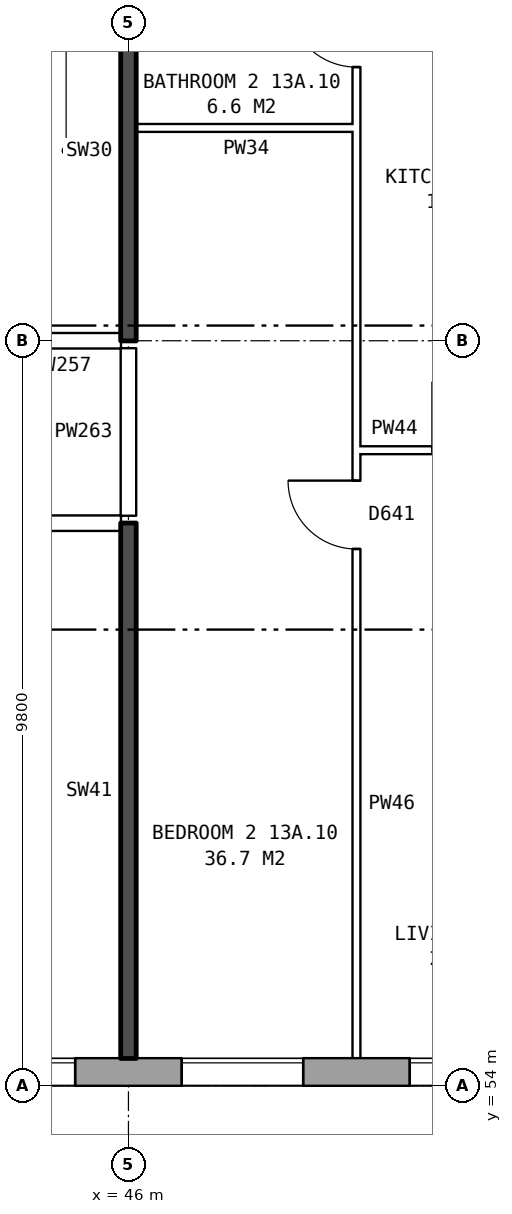
"""IFC4 building model, lengths in metres.
Left out: names, types, materials, properties, quantities, classifications, styles, units other than length and angle.
Written with IfcOpenShell. Run it as: python <this file> out.ifc"""

import sys

from ifc_helpers import new_model, si_unit, direction, frame, frame_2d, origin, place, context, subcontext, project, spatial, rectangle, extrude, element, fill, save


model = new_model("IFC4")
c1 = context("Model", 3, precision=1e-05, world=origin(), true_north=direction((0.0, 1.0)))
c2 = subcontext(c1, "Body", "Model", "MODEL_VIEW")
j1 = project(units=[si_unit("LENGTHUNIT", "METRE"), si_unit("PLANEANGLEUNIT", "RADIAN")], contexts=[c1])
p1 = place(None, origin())
s1 = spatial("IfcSite", under=j1, at=p1, CompositionType="ELEMENT")
p2 = place(p1, origin())
s2 = spatial("IfcBuilding", under=s1, at=p2, CompositionType="ELEMENT")
p3 = place(p2, frame((0.0, 0.0, 50.5)))
s3 = spatial("IfcBuildingStorey", under=s2, at=p3, CompositionType="ELEMENT", Elevation=50.5)
p4 = place(p3, frame((24.575, 54.18, 0.0), z_axis=(0.0, 0.0, 1.0), x_axis=(1.0, 0.0, 0.0)))
e1 = element("IfcWall", 1, at=p4, inside=s3, PredefinedType="STANDARD", context=c2, shape_type="SweptSolid", body=[
    extrude(rectangle(XDim=48.351, YDim=0.36, at=frame_2d((24.175, 0.0))), origin(), (0.0, 0.0, 1.0), 2.85),
])
p5 = place(p4, frame((1.125, 0.0, 0.8)))
e2 = element("IfcOpeningElement", 2, at=p5, cuts=e1, PredefinedType="OPENING", context=c2, shape_type="SweptSolid", body=[
    extrude(rectangle(XDim=1.6, YDim=1.8, at=frame_2d((0.8, 0.9))), frame((0.0, 0.19, 0.0), z_axis=(0.0, -1.0, 0.0), x_axis=(1.0, 0.0, 0.0)), (0.0, 0.0, 1.0), 0.38),
])
p6 = place(p4, frame((4.125, 0.0, 0.8)))
e3 = element("IfcOpeningElement", 3, at=p6, cuts=e1, PredefinedType="OPENING", context=c2, shape_type="SweptSolid", body=[
    extrude(rectangle(XDim=1.6, YDim=1.8, at=frame_2d((0.8, 0.9))), frame((0.0, 0.19, 0.0), z_axis=(0.0, -1.0, 0.0), x_axis=(1.0, 0.0, 0.0)), (0.0, 0.0, 1.0), 0.38),
])
p7 = place(p4, frame((6.025, 0.0, 0.8)))
e4 = element("IfcOpeningElement", 4, at=p7, cuts=e1, PredefinedType="OPENING", context=c2, shape_type="SweptSolid", body=[
    extrude(rectangle(XDim=1.0, YDim=1.8, at=frame_2d((0.5, 0.9))), frame((0.0, 0.19, 0.0), z_axis=(0.0, -1.0, 0.0), x_axis=(1.0, 0.0, 0.0)), (0.0, 0.0, 1.0), 0.38),
])
p8 = place(p4, frame((9.775, 0.0, 0.8)))
e5 = element("IfcOpeningElement", 5, at=p8, cuts=e1, PredefinedType="OPENING", context=c2, shape_type="SweptSolid", body=[
    extrude(rectangle(XDim=1.0, YDim=0.9, at=frame_2d((0.5, 0.45))), frame((0.0, 0.19, 0.0), z_axis=(0.0, -1.0, 0.0), x_axis=(1.0, 0.0, 0.0)), (0.0, 0.0, 1.0), 0.38),
])
p9 = place(p4, frame((13.125, 0.0, 0.8)))
e6 = element("IfcOpeningElement", 6, at=p9, cuts=e1, PredefinedType="OPENING", context=c2, shape_type="SweptSolid", body=[
    extrude(rectangle(XDim=1.6, YDim=1.8, at=frame_2d((0.8, 0.9))), frame((0.0, 0.19, 0.0), z_axis=(0.0, -1.0, 0.0), x_axis=(1.0, 0.0, 0.0)), (0.0, 0.0, 1.0), 0.38),
])
p10 = place(p4, frame((16.125, 0.0, 0.8)))
e7 = element("IfcOpeningElement", 7, at=p10, cuts=e1, PredefinedType="OPENING", context=c2, shape_type="SweptSolid", body=[
    extrude(rectangle(XDim=1.6, YDim=1.8, at=frame_2d((0.8, 0.9))), frame((0.0, 0.19, 0.0), z_axis=(0.0, -1.0, 0.0), x_axis=(1.0, 0.0, 0.0)), (0.0, 0.0, 1.0), 0.38),
])
p11 = place(p4, frame((19.125, 0.0, 0.8)))
e8 = element("IfcOpeningElement", 8, at=p11, cuts=e1, PredefinedType="OPENING", context=c2, shape_type="SweptSolid", body=[
    extrude(rectangle(XDim=1.6, YDim=1.8, at=frame_2d((0.8, 0.9))), frame((0.0, 0.19, 0.0), z_axis=(0.0, -1.0, 0.0), x_axis=(1.0, 0.0, 0.0)), (0.0, 0.0, 1.0), 0.38),
])
p12 = place(p4, frame((22.125, 0.0, 0.8)))
e9 = element("IfcOpeningElement", 9, at=p12, cuts=e1, PredefinedType="OPENING", context=c2, shape_type="SweptSolid", body=[
    extrude(rectangle(XDim=1.6, YDim=1.8, at=frame_2d((0.8, 0.9))), frame((0.0, 0.19, 0.0), z_axis=(0.0, -1.0, 0.0), x_axis=(1.0, 0.0, 0.0)), (0.0, 0.0, 1.0), 0.38),
])
p13 = place(p4, frame((25.125, 0.0, 0.8)))
e10 = element("IfcOpeningElement", 10, at=p13, cuts=e1, PredefinedType="OPENING", context=c2, shape_type="SweptSolid", body=[
    extrude(rectangle(XDim=1.6, YDim=1.8, at=frame_2d((0.8, 0.9))), frame((0.0, 0.19, 0.0), z_axis=(0.0, -1.0, 0.0), x_axis=(1.0, 0.0, 0.0)), (0.0, 0.0, 1.0), 0.38),
])
p14 = place(p4, frame((28.125, 0.0, 0.8)))
e11 = element("IfcOpeningElement", 11, at=p14, cuts=e1, PredefinedType="OPENING", context=c2, shape_type="SweptSolid", body=[
    extrude(rectangle(XDim=1.6, YDim=1.8, at=frame_2d((0.8, 0.9))), frame((0.0, 0.19, 0.0), z_axis=(0.0, -1.0, 0.0), x_axis=(1.0, 0.0, 0.0)), (0.0, 0.0, 1.0), 0.38),
])
p15 = place(p4, frame((31.125, 0.0, 0.8)))
e12 = element("IfcOpeningElement", 12, at=p15, cuts=e1, PredefinedType="OPENING", context=c2, shape_type="SweptSolid", body=[
    extrude(rectangle(XDim=1.6, YDim=1.8, at=frame_2d((0.8, 0.9))), frame((0.0, 0.19, 0.0), z_axis=(0.0, -1.0, 0.0), x_axis=(1.0, 0.0, 0.0)), (0.0, 0.0, 1.0), 0.38),
])
p16 = place(p4, frame((34.125, 0.0, 0.8)))
e13 = element("IfcOpeningElement", 13, at=p16, cuts=e1, PredefinedType="OPENING", context=c2, shape_type="SweptSolid", body=[
    extrude(rectangle(XDim=1.6, YDim=1.8, at=frame_2d((0.8, 0.9))), frame((0.0, 0.19, 0.0), z_axis=(0.0, -1.0, 0.0), x_axis=(1.0, 0.0, 0.0)), (0.0, 0.0, 1.0), 0.38),
])
p17 = place(p4, frame((36.575, 0.0, 0.45)))
e14 = element("IfcOpeningElement", 14, at=p17, cuts=e1, PredefinedType="OPENING", context=c2, shape_type="SweptSolid", body=[
    extrude(rectangle(XDim=1.2, YDim=1.8, at=frame_2d((0.6, 0.9))), frame((0.0, 0.19, 0.0), z_axis=(0.0, -1.0, 0.0), x_axis=(1.0, 0.0, 0.0)), (0.0, 0.0, 1.0), 0.38),
])
p18 = place(p4, frame((39.975, 0.0, 1.7)))
e15 = element("IfcOpeningElement", 15, at=p18, cuts=e1, PredefinedType="OPENING", context=c2, shape_type="SweptSolid", body=[
    extrude(rectangle(XDim=1.0, YDim=0.9, at=frame_2d((0.5, 0.45))), frame((0.0, 0.19, 0.0), z_axis=(0.0, -1.0, 0.0), x_axis=(1.0, 0.0, 0.0)), (0.0, 0.0, 1.0), 0.38),
])
p19 = place(p4, frame((43.125, 0.0, 0.8)))
e16 = element("IfcOpeningElement", 16, at=p19, cuts=e1, PredefinedType="OPENING", context=c2, shape_type="SweptSolid", body=[
    extrude(rectangle(XDim=1.6, YDim=1.8, at=frame_2d((0.8, 0.9))), frame((0.0, 0.19, 0.0), z_axis=(0.0, -1.0, 0.0), x_axis=(1.0, 0.0, 0.0)), (0.0, 0.0, 1.0), 0.38),
])
p20 = place(p4, frame((46.125, 0.0, 0.8)))
e17 = element("IfcOpeningElement", 17, at=p20, cuts=e1, PredefinedType="OPENING", context=c2, shape_type="SweptSolid", body=[
    extrude(rectangle(XDim=1.6, YDim=1.8, at=frame_2d((0.8, 0.9))), frame((0.0, 0.19, 0.0), z_axis=(0.0, -1.0, 0.0), x_axis=(1.0, 0.0, 0.0)), (0.0, 0.0, 1.0), 0.38),
])
p21 = place(p4, frame((7.325, 0.0, 1.7)))
e18 = element("IfcOpeningElement", 18, at=p21, cuts=e1, PredefinedType="OPENING", context=c2, shape_type="SweptSolid", body=[
    extrude(rectangle(XDim=1.0, YDim=0.9, at=frame_2d((0.5, 0.45))), frame((0.0, 0.19, 0.0), z_axis=(0.0, -1.0, 0.0), x_axis=(1.0, 0.0, 0.0)), (0.0, 0.0, 1.0), 0.38),
])
p22 = place(p4, frame((11.075, 0.0, 0.8)))
e19 = element("IfcOpeningElement", 19, at=p22, cuts=e1, PredefinedType="OPENING", context=c2, shape_type="SweptSolid", body=[
    extrude(rectangle(XDim=1.0, YDim=1.8, at=frame_2d((0.5, 0.9))), frame((0.0, 0.19, 0.0), z_axis=(0.0, -1.0, 0.0), x_axis=(1.0, 0.0, 0.0)), (0.0, 0.0, 1.0), 0.38),
])
p23 = place(p4, frame((38.075, 0.0, 0.45)))
e20 = element("IfcOpeningElement", 20, at=p23, cuts=e1, PredefinedType="OPENING", context=c2, shape_type="SweptSolid", body=[
    extrude(rectangle(XDim=1.0, YDim=0.9, at=frame_2d((0.5, 0.45))), frame((0.0, 0.19, 0.0), z_axis=(0.0, -1.0, 0.0), x_axis=(1.0, 0.0, 0.0)), (0.0, 0.0, 1.0), 0.38),
])
p24 = place(p4, frame((41.275, 0.0, 0.8)))
e21 = element("IfcOpeningElement", 21, at=p24, cuts=e1, PredefinedType="OPENING", context=c2, shape_type="SweptSolid", body=[
    extrude(rectangle(XDim=1.4, YDim=1.8, at=frame_2d((0.7, 0.9))), frame((0.0, 0.19, 0.0), z_axis=(0.0, -1.0, 0.0), x_axis=(1.0, 0.0, 0.0)), (0.0, 0.0, 1.0), 0.38),
])
p25 = place(p3, frame((21.86, 61.4, 0.0), z_axis=(0.0, 0.0, 1.0), x_axis=(1.0, 0.0, 0.0)))
e22 = element("IfcWall", 22, at=p25, inside=s3, PredefinedType="PARTITIONING", context=c2, shape_type="SweptSolid", body=[
    extrude(rectangle(XDim=24.04, YDim=0.2, at=frame_2d((12.02, 0.0))), origin(), (0.0, 0.0, 1.0), 2.85),
])
p26 = place(p25, frame((20.59, 0.0, 0.0)))
e23 = element("IfcOpeningElement", 23, at=p26, cuts=e22, PredefinedType="OPENING", context=c2, shape_type="SweptSolid", body=[
    extrude(rectangle(XDim=1.0, YDim=2.1, at=frame_2d((0.5, 1.05))), frame((0.0, 0.11, 0.0), z_axis=(0.0, -1.0, 0.0), x_axis=(1.0, 0.0, 0.0)), (0.0, 0.0, 1.0), 0.22),
])
p27 = place(p25, frame((8.64, 0.0, 0.0)))
e24 = element("IfcOpeningElement", 24, at=p27, cuts=e22, PredefinedType="OPENING", context=c2, shape_type="SweptSolid", body=[
    extrude(rectangle(XDim=1.0, YDim=2.1, at=frame_2d((0.5, 1.05))), frame((0.0, 0.11, 0.0), z_axis=(0.0, -1.0, 0.0), x_axis=(1.0, 0.0, 0.0)), (0.0, 0.0, 1.0), 0.22),
])
p28 = place(p25, frame((3.64, 0.0, 0.0)))
e25 = element("IfcOpeningElement", 25, at=p28, cuts=e22, PredefinedType="OPENING", context=c2, shape_type="SweptSolid", body=[
    extrude(rectangle(XDim=1.0, YDim=2.1, at=frame_2d((0.5, 1.05))), frame((0.0, 0.11, 0.0), z_axis=(0.0, -1.0, 0.0), x_axis=(1.0, 0.0, 0.0)), (0.0, 0.0, 1.0), 0.22),
])
p29 = place(p3, frame((49.0, 62.36, 0.0), z_axis=(0.0, 0.0, 1.0), x_axis=(1.0, 0.0, 0.0)))
e26 = element("IfcWall", 26, at=p29, inside=s3, PredefinedType="PARTITIONING", context=c2, shape_type="SweptSolid", body=[
    extrude(rectangle(XDim=2.9, YDim=0.1, at=frame_2d((1.45, 0.0))), origin(), (0.0, 0.0, 1.0), 2.85),
])
p30 = place(p29, frame((1.0, 0.0, 0.0)))
e27 = element("IfcOpeningElement", 27, at=p30, cuts=e26, PredefinedType="OPENING", context=c2, shape_type="SweptSolid", body=[
    extrude(rectangle(XDim=0.9, YDim=2.1, at=frame_2d((0.45, 1.05))), frame((0.0, 0.06, 0.0), z_axis=(0.0, -1.0, 0.0), x_axis=(1.0, 0.0, 0.0)), (0.0, 0.0, 1.0), 0.12),
])
p31 = place(p3, frame((44.36, 63.8, 0.0), z_axis=(0.0, 0.0, 1.0), x_axis=(1.0, 0.0, 0.0)))
e28 = element("IfcWall", 28, at=p31, inside=s3, PredefinedType="PARTITIONING", context=c2, shape_type="SweptSolid", body=[
    extrude(rectangle(XDim=1.54, YDim=0.2, at=frame_2d((0.77, 0.0))), origin(), (0.0, 0.0, 1.0), 2.85),
])
p32 = place(p3, frame((46.1, 66.6, 0.0), z_axis=(0.0, 0.0, 1.0), x_axis=(1.0, 0.0, 0.0)))
e29 = element("IfcWall", 29, at=p32, inside=s3, PredefinedType="PARTITIONING", context=c2, shape_type="SweptSolid", body=[
    extrude(rectangle(XDim=2.9, YDim=0.1, at=frame_2d((1.45, 0.0))), origin(), (0.0, 0.0, 1.0), 2.85),
])
p33 = place(p3, frame((46.0, 54.36, 0.0), z_axis=(0.0, 0.0, 1.0), x_axis=(0.0, 1.0, 0.0)))
e30 = element("IfcWall", 30, at=p33, inside=s3, PredefinedType="SOLIDWALL", context=c2, shape_type="SweptSolid", body=[
    extrude(rectangle(XDim=7.04, YDim=0.2, at=frame_2d((3.52, 0.0))), origin(), (0.0, 0.0, 1.0), 2.85),
])
p34 = place(p3, frame((46.0, 61.5, 0.0), z_axis=(0.0, 0.0, 1.0), x_axis=(0.0, 1.0, 0.0)))
e31 = element("IfcWall", 31, at=p34, inside=s3, PredefinedType="PARTITIONING", context=c2, shape_type="SweptSolid", body=[
    extrude(rectangle(XDim=2.2, YDim=0.2, at=frame_2d((1.1, 0.0))), origin(), (0.0, 0.0, 1.0), 2.85),
])
p35 = place(p3, frame((46.0, 63.8, 0.0), z_axis=(0.0, 0.0, 1.0), x_axis=(0.0, 1.0, 0.0)))
e32 = element("IfcWall", 32, at=p35, inside=s3, PredefinedType="SOLIDWALL", context=c2, shape_type="SweptSolid", body=[
    extrude(rectangle(XDim=5.0, YDim=0.2, at=frame_2d((2.5, 0.0))), origin(), (0.0, 0.0, 1.0), 2.85),
])
p36 = place(p3, frame((49.0, 54.36, 0.0), z_axis=(0.0, 0.0, 1.0), x_axis=(0.0, 1.0, 0.0)))
e33 = element("IfcWall", 33, at=p36, inside=s3, PredefinedType="PARTITIONING", context=c2, shape_type="SweptSolid", body=[
    extrude(rectangle(XDim=14.34, YDim=0.1, at=frame_2d((7.17, 0.0))), origin(), (0.0, 0.0, 1.0), 2.85),
])
p37 = place(p36, frame((6.7, 0.0, 0.0)))
e34 = element("IfcOpeningElement", 34, at=p37, cuts=e33, PredefinedType="OPENING", context=c2, shape_type="SweptSolid", body=[
    extrude(rectangle(XDim=0.9, YDim=2.1, at=frame_2d((0.45, 1.05))), frame((0.0, 0.06, 0.0), z_axis=(0.0, -1.0, 0.0), x_axis=(1.0, 0.0, 0.0)), (0.0, 0.0, 1.0), 0.12),
])
p38 = place(p36, frame((13.04, 0.0, 0.0)))
e35 = element("IfcOpeningElement", 35, at=p38, cuts=e33, PredefinedType="OPENING", context=c2, shape_type="SweptSolid", body=[
    extrude(rectangle(XDim=0.9, YDim=2.1, at=frame_2d((0.45, 1.05))), frame((0.0, 0.06, 0.0), z_axis=(0.0, -1.0, 0.0), x_axis=(1.0, 0.0, 0.0)), (0.0, 0.0, 1.0), 0.12),
])
p39 = place(p11, origin())
e36 = element("IfcWindow", 36, at=p39, inside=s3, PartitioningType="SINGLE_PANEL", PredefinedType="WINDOW", context=c2, shape_type="SweptSolid", body=[
    extrude(rectangle(XDim=1.6, YDim=1.8, at=frame_2d((0.8, 0.9))), frame((0.0, 0.15, 0.0), z_axis=(0.0, -1.0, 0.0), x_axis=(1.0, 0.0, 0.0)), (0.0, 0.0, 1.0), 0.06),
])
fill(e8, e36)
p40 = place(p12, origin())
e37 = element("IfcWindow", 37, at=p40, inside=s3, PartitioningType="SINGLE_PANEL", PredefinedType="WINDOW", context=c2, shape_type="SweptSolid", body=[
    extrude(rectangle(XDim=1.6, YDim=1.8, at=frame_2d((0.8, 0.9))), frame((0.0, 0.15, 0.0), z_axis=(0.0, -1.0, 0.0), x_axis=(1.0, 0.0, 0.0)), (0.0, 0.0, 1.0), 0.06),
])
fill(e9, e37)
p41 = place(p13, origin())
e38 = element("IfcWindow", 38, at=p41, inside=s3, PartitioningType="SINGLE_PANEL", PredefinedType="WINDOW", context=c2, shape_type="SweptSolid", body=[
    extrude(rectangle(XDim=1.6, YDim=1.8, at=frame_2d((0.8, 0.9))), frame((0.0, 0.15, 0.0), z_axis=(0.0, -1.0, 0.0), x_axis=(1.0, 0.0, 0.0)), (0.0, 0.0, 1.0), 0.06),
])
fill(e10, e38)
p42 = place(p37, origin())
e39 = element("IfcDoor", 39, at=p42, inside=s3, OperationType="SINGLE_SWING_RIGHT", PredefinedType="DOOR", context=c2, shape_type="SweptSolid", body=[
    extrude(rectangle(XDim=0.9, YDim=2.1, at=frame_2d((0.45, 1.05))), frame((0.0, 0.025, 0.0), z_axis=(0.0, -1.0, 0.0), x_axis=(1.0, 0.0, 0.0)), (0.0, 0.0, 1.0), 0.05),
])
fill(e34, e39)
p43 = place(p38, origin())
e40 = element("IfcDoor", 40, at=p43, inside=s3, OperationType="SINGLE_SWING_RIGHT", PredefinedType="DOOR", context=c2, shape_type="SweptSolid", body=[
    extrude(rectangle(XDim=0.9, YDim=2.1, at=frame_2d((0.45, 1.05))), frame((0.0, 0.025, 0.0), z_axis=(0.0, -1.0, 0.0), x_axis=(1.0, 0.0, 0.0)), (0.0, 0.0, 1.0), 0.05),
])
fill(e35, e40)
save(model, sys.argv[1])
